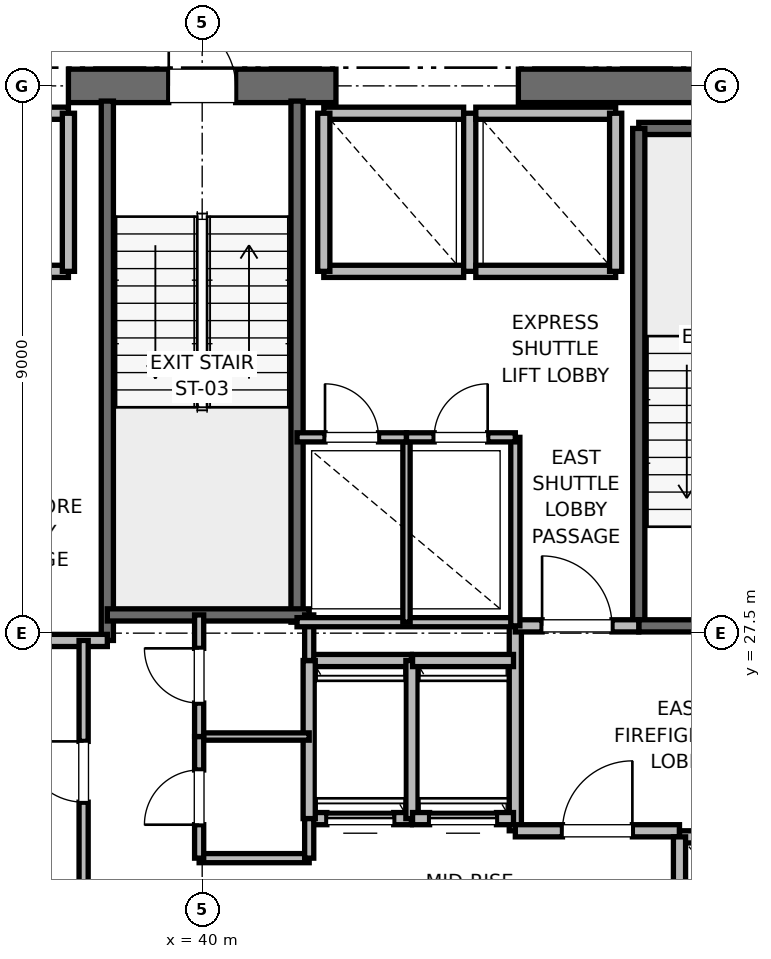
"""IFC4 building model, lengths in metres.
Left out: names, types, materials, properties, quantities, classifications, styles, units other than length and angle.
Written with IfcOpenShell. Run it as: python <this file> out.ifc"""

import sys

from ifc_helpers import new_model, si_unit, direction, frame, frame_2d, origin, place, context, subcontext, project, spatial, rectangle, extrude, element, fill, save


model = new_model("IFC4")
c1 = context("Model", 3, precision=1e-05, world=origin(), true_north=direction((0.0, 1.0)))
c2 = subcontext(c1, "Body", "Model", "MODEL_VIEW")
j1 = project(units=[si_unit("LENGTHUNIT", "METRE"), si_unit("PLANEANGLEUNIT", "RADIAN")], contexts=[c1])
p1 = place(None, origin())
s1 = spatial("IfcSite", under=j1, at=p1, CompositionType="ELEMENT")
p2 = place(p1, origin())
s2 = spatial("IfcBuilding", under=s1, at=p2, CompositionType="ELEMENT")
p3 = place(p2, frame((0.0, 0.0, 229.2)))
s3 = spatial("IfcBuildingStorey", under=s2, at=p3, CompositionType="ELEMENT", Elevation=229.2)
p4 = place(p3, frame((37.8, 36.5, 0.0), z_axis=(0.0, 0.0, 1.0), x_axis=(1.0, 0.0, 0.0)))
e1 = element("IfcWall", 1, at=p4, inside=s3, PredefinedType="SHEAR", context=c2, shape_type="SweptSolid", body=[
    extrude(rectangle(XDim=4.4, YDim=0.55, at=frame_2d((2.2, 0.0))), origin(), (0.0, 0.0, 1.0), 3.7),
])
p5 = place(p4, frame((1.65, 0.0, 0.0)))
e2 = element("IfcOpeningElement", 2, at=p5, cuts=e1, PredefinedType="OPENING", context=c2, shape_type="SweptSolid", body=[
    extrude(rectangle(XDim=1.1, YDim=2.15, at=frame_2d((0.55, 1.075))), frame((0.0, 0.275, 0.0), z_axis=(0.0, -1.0, 0.0), x_axis=(1.0, 0.0, 0.0)), (0.0, 0.0, 1.0), 0.55),
])
p6 = place(p3, frame((45.2, 36.5, 0.0), z_axis=(0.0, 0.0, 1.0), x_axis=(1.0, 0.0, 0.0)))
e3 = element("IfcWall", 3, at=p6, inside=s3, PredefinedType="SHEAR", context=c2, shape_type="SweptSolid", body=[
    extrude(rectangle(XDim=5.8, YDim=0.55, at=frame_2d((2.9, 0.0))), origin(), (0.0, 0.0, 1.0), 3.7),
])
p7 = place(p3, frame((47.18, 35.8, 0.0), z_axis=(0.0, 0.0, 1.0), x_axis=(1.0, 0.0, 0.0)))
e4 = element("IfcWall", 4, at=p7, inside=s3, PredefinedType="SOLIDWALL", context=c2, shape_type="SweptSolid", body=[
    extrude(rectangle(XDim=3.12, YDim=0.2, at=frame_2d((1.56, 0.0))), origin(), (0.0, 0.0, 1.0), 3.7),
])
p8 = place(p3, frame((47.18, 27.62, 0.0), z_axis=(0.0, 0.0, 1.0), x_axis=(0.0, 1.0, 0.0)))
e5 = element("IfcWall", 5, at=p8, inside=s3, PredefinedType="SOLIDWALL", context=c2, shape_type="SweptSolid", body=[
    extrude(rectangle(XDim=8.18, YDim=0.2, at=frame_2d((4.09, 0.0))), origin(), (0.0, 0.0, 1.0), 3.7),
])
p9 = place(p3, frame((47.18, 27.62, 0.0), z_axis=(0.0, 0.0, 1.0), x_axis=(1.0, 0.0, 0.0)))
e6 = element("IfcWall", 6, at=p9, inside=s3, PredefinedType="SOLIDWALL", context=c2, shape_type="SweptSolid", body=[
    extrude(rectangle(XDim=3.12, YDim=0.2, at=frame_2d((1.56, 0.0))), origin(), (0.0, 0.0, 1.0), 3.7),
])
p10 = place(p9, frame((1.01, 0.0, 0.0)))
e7 = element("IfcOpeningElement", 7, at=p10, cuts=e6, PredefinedType="OPENING", context=c2, shape_type="SweptSolid", body=[
    extrude(rectangle(XDim=1.1, YDim=2.15, at=frame_2d((0.55, 1.075))), frame((0.0, 0.1, 0.0), z_axis=(0.0, -1.0, 0.0), x_axis=(1.0, 0.0, 0.0)), (0.0, 0.0, 1.0), 0.2),
])
p11 = place(p3, frame((38.44, 27.38, 0.0), z_axis=(0.0, 0.0, 1.0), x_axis=(0.0, 1.0, 0.0)))
e8 = element("IfcWall", 8, at=p11, inside=s3, PredefinedType="SOLIDWALL", context=c2, shape_type="SweptSolid", body=[
    extrude(rectangle(XDim=8.87, YDim=0.2, at=frame_2d((4.435, 0.0))), origin(), (0.0, 0.0, 1.0), 3.7),
])
p12 = place(p3, frame((41.56, 27.68, 0.0), z_axis=(0.0, 0.0, 1.0), x_axis=(0.0, 1.0, 0.0)))
e9 = element("IfcWall", 9, at=p12, inside=s3, PredefinedType="SOLIDWALL", context=c2, shape_type="SweptSolid", body=[
    extrude(rectangle(XDim=8.57, YDim=0.2, at=frame_2d((4.285, 0.0))), origin(), (0.0, 0.0, 1.0), 3.7),
])
p13 = place(p3, frame((38.44, 27.8, 0.0), z_axis=(0.0, 0.0, 1.0), x_axis=(1.0, 0.0, 0.0)))
e10 = element("IfcWall", 10, at=p13, inside=s3, PredefinedType="SOLIDWALL", context=c2, shape_type="SweptSolid", body=[
    extrude(rectangle(XDim=3.32, YDim=0.2, at=frame_2d((1.66, 0.0))), origin(), (0.0, 0.0, 1.0), 3.7),
])
p14 = place(p3, frame((32.82, 27.38, 0.0), z_axis=(0.0, 0.0, 1.0), x_axis=(1.0, 0.0, 0.0)))
e11 = element("IfcWall", 11, at=p14, inside=s3, PredefinedType="PARTITIONING", context=c2, shape_type="SweptSolid", body=[
    extrude(rectangle(XDim=5.62, YDim=0.2, at=frame_2d((2.81, 0.0))), origin(), (0.0, 0.0, 1.0), 3.7),
])
p15 = place(p3, frame((45.15, 24.25, 0.0), z_axis=(0.0, 0.0, 1.0), x_axis=(0.0, 1.0, 0.0)))
e12 = element("IfcWall", 12, at=p15, inside=s3, PredefinedType="PARTITIONING", context=c2, shape_type="SweptSolid", body=[
    extrude(rectangle(XDim=3.37, YDim=0.2, at=frame_2d((1.685, 0.0))), origin(), (0.0, 0.0, 1.0), 3.7),
])
p16 = place(p3, frame((45.15, 24.25, 0.0), z_axis=(0.0, 0.0, 1.0), x_axis=(1.0, 0.0, 0.0)))
e13 = element("IfcWall", 13, at=p16, inside=s3, PredefinedType="PARTITIONING", context=c2, shape_type="SweptSolid", body=[
    extrude(rectangle(XDim=2.7, YDim=0.2, at=frame_2d((1.35, 0.0))), origin(), (0.0, 0.0, 1.0), 3.7),
])
p17 = place(p16, frame((0.775, 0.0, 0.0)))
e14 = element("IfcOpeningElement", 14, at=p17, cuts=e13, PredefinedType="OPENING", context=c2, shape_type="SweptSolid", body=[
    extrude(rectangle(XDim=1.15, YDim=2.2, at=frame_2d((0.575, 1.1))), frame((0.0, 0.1, 0.0), z_axis=(0.0, -1.0, 0.0), x_axis=(1.0, 0.0, 0.0)), (0.0, 0.0, 1.0), 0.2),
])
p18 = place(p3, frame((45.15, 27.62, 0.0), z_axis=(0.0, 0.0, 1.0), x_axis=(1.0, 0.0, 0.0)))
e15 = element("IfcWall", 15, at=p18, inside=s3, PredefinedType="PARTITIONING", context=c2, shape_type="SweptSolid", body=[
    extrude(rectangle(XDim=2.03, YDim=0.2, at=frame_2d((1.015, 0.0))), origin(), (0.0, 0.0, 1.0), 3.7),
])
p19 = place(p18, frame((0.44, 0.0, 0.0)))
e16 = element("IfcOpeningElement", 16, at=p19, cuts=e15, PredefinedType="OPENING", context=c2, shape_type="SweptSolid", body=[
    extrude(rectangle(XDim=1.15, YDim=2.2, at=frame_2d((0.575, 1.1))), frame((0.0, 0.1, 0.0), z_axis=(0.0, -1.0, 0.0), x_axis=(1.0, 0.0, 0.0)), (0.0, 0.0, 1.0), 0.2),
])
p20 = place(p3, frame((50.45, 24.15, 0.0), z_axis=(0.0, 0.0, 1.0), x_axis=(-1.0, 0.0, 0.0)))
e17 = element("IfcWall", 17, at=p20, inside=s3, PredefinedType="SOLIDWALL", context=c2, shape_type="SweptSolid", body=[
    extrude(rectangle(XDim=2.6, YDim=0.2, at=frame_2d((1.3, 0.0))), origin(), (0.0, 0.0, 1.0), 2.68),
])
p21 = place(p20, frame((0.75, 0.0, 0.0)))
e18 = element("IfcOpeningElement", 18, at=p21, cuts=e17, PredefinedType="OPENING", context=c2, shape_type="SweptSolid", body=[
    extrude(rectangle(XDim=1.1, YDim=2.2, at=frame_2d((0.55, 1.1))), frame((0.0, 0.1, 0.0), z_axis=(0.0, -1.0, 0.0), x_axis=(1.0, 0.0, 0.0)), (0.0, 0.0, 1.0), 0.2),
])
p22 = place(p3, frame((47.85, 24.15, 0.0), z_axis=(0.0, 0.0, 1.0), x_axis=(0.0, -1.0, 0.0)))
e19 = element("IfcWall", 19, at=p22, inside=s3, PredefinedType="SOLIDWALL", context=c2, shape_type="SweptSolid", body=[
    extrude(rectangle(XDim=3.0, YDim=0.2, at=frame_2d((1.5, 0.0))), origin(), (0.0, 0.0, 1.0), 3.7),
])
p23 = place(p3, frame((41.76, 24.45, 0.0), z_axis=(0.0, 0.0, 1.0), x_axis=(1.0, 0.0, 0.0)))
e20 = element("IfcWall", 20, at=p23, inside=s3, PredefinedType="SOLIDWALL", context=c2, shape_type="SweptSolid", body=[
    extrude(rectangle(XDim=1.68, YDim=0.2, at=frame_2d((0.84, 0.0))), origin(), (0.0, 0.0, 1.0), 3.7),
])
p24 = place(p23, frame((0.29, 0.0, 0.0)))
e21 = element("IfcOpeningElement", 21, at=p24, cuts=e20, PredefinedType="OPENING", context=c2, shape_type="SweptSolid", body=[
    extrude(rectangle(XDim=1.1, YDim=2.2, at=frame_2d((0.55, 1.1))), frame((0.0, 0.1, 0.0), z_axis=(0.0, -1.0, 0.0), x_axis=(1.0, 0.0, 0.0)), (0.0, 0.0, 1.0), 0.2),
])
p25 = place(p3, frame((43.44, 27.05, 0.0), z_axis=(0.0, 0.0, 1.0), x_axis=(-1.0, 0.0, 0.0)))
e22 = element("IfcWall", 22, at=p25, inside=s3, PredefinedType="SOLIDWALL", context=c2, shape_type="SweptSolid", body=[
    extrude(rectangle(XDim=1.68, YDim=0.2, at=frame_2d((0.84, 0.0))), origin(), (0.0, 0.0, 1.0), 3.7),
])
for number, where, z_axis, x_axis in (
    (23, (41.76, 27.05, 0.0), (0.0, 0.0, 1.0), (0.0, -1.0, 0.0)),
    (24, (43.45, 24.45, 0.0), (0.0, 0.0, 1.0), (0.0, 1.0, 0.0)),
):
    element("IfcWall", number, at=place(p3, frame(where, z_axis=z_axis, x_axis=x_axis)), inside=s3, PredefinedType="SOLIDWALL", context=c2, shape_type="SweptSolid", body=[
        extrude(rectangle(XDim=2.6, YDim=0.2, at=frame_2d((1.3, 0.0))), origin(), (0.0, 0.0, 1.0), 3.7),
    ])
p26 = place(p3, frame((43.46, 24.45, 0.0), z_axis=(0.0, 0.0, 1.0), x_axis=(1.0, 0.0, 0.0)))
e25 = element("IfcWall", 25, at=p26, inside=s3, PredefinedType="SOLIDWALL", context=c2, shape_type="SweptSolid", body=[
    extrude(rectangle(XDim=1.66, YDim=0.2, at=frame_2d((0.83, 0.0))), origin(), (0.0, 0.0, 1.0), 3.7),
])
p27 = place(p26, frame((0.28, 0.0, 0.0)))
e26 = element("IfcOpeningElement", 26, at=p27, cuts=e25, PredefinedType="OPENING", context=c2, shape_type="SweptSolid", body=[
    extrude(rectangle(XDim=1.1, YDim=2.2, at=frame_2d((0.55, 1.1))), frame((0.0, 0.1, 0.0), z_axis=(0.0, -1.0, 0.0), x_axis=(1.0, 0.0, 0.0)), (0.0, 0.0, 1.0), 0.2),
])
p28 = place(p3, frame((45.12, 27.05, 0.0), z_axis=(0.0, 0.0, 1.0), x_axis=(-1.0, 0.0, 0.0)))
e27 = element("IfcWall", 27, at=p28, inside=s3, PredefinedType="SOLIDWALL", context=c2, shape_type="SweptSolid", body=[
    extrude(rectangle(XDim=1.66, YDim=0.2, at=frame_2d((0.83, 0.0))), origin(), (0.0, 0.0, 1.0), 3.7),
])
p29 = place(p3, frame((35.5, 33.45, 0.0), z_axis=(0.0, 0.0, 1.0), x_axis=(1.0, 0.0, 0.0)))
e28 = element("IfcWall", 28, at=p29, inside=s3, PredefinedType="SOLIDWALL", context=c2, shape_type="SweptSolid", body=[
    extrude(rectangle(XDim=2.3, YDim=0.2, at=frame_2d((1.15, 0.0))), origin(), (0.0, 0.0, 1.0), 3.7),
])
p30 = place(p3, frame((37.8, 36.05, 0.0), z_axis=(0.0, 0.0, 1.0), x_axis=(-1.0, 0.0, 0.0)))
e29 = element("IfcWall", 29, at=p30, inside=s3, PredefinedType="SOLIDWALL", context=c2, shape_type="SweptSolid", body=[
    extrude(rectangle(XDim=2.3, YDim=0.2, at=frame_2d((1.15, 0.0))), origin(), (0.0, 0.0, 1.0), 2.68),
])
p31 = place(p3, frame((37.8, 33.45, 0.0), z_axis=(0.0, 0.0, 1.0), x_axis=(0.0, 1.0, 0.0)))
e30 = element("IfcWall", 30, at=p31, inside=s3, PredefinedType="SOLIDWALL", context=c2, shape_type="SweptSolid", body=[
    extrude(rectangle(XDim=2.6, YDim=0.2, at=frame_2d((1.3, 0.0))), origin(), (0.0, 0.0, 1.0), 2.68),
])
p32 = place(p3, frame((42.0, 33.45, 0.0), z_axis=(0.0, 0.0, 1.0), x_axis=(1.0, 0.0, 0.0)))
e31 = element("IfcWall", 31, at=p32, inside=s3, PredefinedType="SOLIDWALL", context=c2, shape_type="SweptSolid", body=[
    extrude(rectangle(XDim=2.3, YDim=0.2, at=frame_2d((1.15, 0.0))), origin(), (0.0, 0.0, 1.0), 3.7),
])
p33 = place(p3, frame((44.3, 36.05, 0.0), z_axis=(0.0, 0.0, 1.0), x_axis=(-1.0, 0.0, 0.0)))
e32 = element("IfcWall", 32, at=p33, inside=s3, PredefinedType="SOLIDWALL", context=c2, shape_type="SweptSolid", body=[
    extrude(rectangle(XDim=2.3, YDim=0.2, at=frame_2d((1.15, 0.0))), origin(), (0.0, 0.0, 1.0), 2.68),
])
for number, where, z_axis, x_axis in (
    (33, (42.0, 36.05, 0.0), (0.0, 0.0, 1.0), (0.0, -1.0, 0.0)),
    (34, (44.4, 33.45, 0.0), (0.0, 0.0, 1.0), (0.0, 1.0, 0.0)),
):
    element("IfcWall", number, at=place(p3, frame(where, z_axis=z_axis, x_axis=x_axis)), inside=s3, PredefinedType="SOLIDWALL", context=c2, shape_type="SweptSolid", body=[
        extrude(rectangle(XDim=2.6, YDim=0.2, at=frame_2d((1.3, 0.0))), origin(), (0.0, 0.0, 1.0), 2.68),
    ])
p34 = place(p3, frame((44.5, 33.45, 0.0), z_axis=(0.0, 0.0, 1.0), x_axis=(1.0, 0.0, 0.0)))
e35 = element("IfcWall", 35, at=p34, inside=s3, PredefinedType="SOLIDWALL", context=c2, shape_type="SweptSolid", body=[
    extrude(rectangle(XDim=2.3, YDim=0.2, at=frame_2d((1.15, 0.0))), origin(), (0.0, 0.0, 1.0), 3.7),
])
p35 = place(p3, frame((46.8, 36.05, 0.0), z_axis=(0.0, 0.0, 1.0), x_axis=(-1.0, 0.0, 0.0)))
e36 = element("IfcWall", 36, at=p35, inside=s3, PredefinedType="SOLIDWALL", context=c2, shape_type="SweptSolid", body=[
    extrude(rectangle(XDim=2.3, YDim=0.2, at=frame_2d((1.15, 0.0))), origin(), (0.0, 0.0, 1.0), 2.68),
])
p36 = place(p3, frame((46.8, 33.45, 0.0), z_axis=(0.0, 0.0, 1.0), x_axis=(0.0, 1.0, 0.0)))
e37 = element("IfcWall", 37, at=p36, inside=s3, PredefinedType="SOLIDWALL", context=c2, shape_type="SweptSolid", body=[
    extrude(rectangle(XDim=2.6, YDim=0.2, at=frame_2d((1.3, 0.0))), origin(), (0.0, 0.0, 1.0), 3.7),
])
p37 = place(p3, frame((39.95, 23.8, 0.0), z_axis=(0.0, 0.0, 1.0), x_axis=(1.0, 0.0, 0.0)))
e38 = element("IfcWall", 38, at=p37, inside=s3, PredefinedType="PARTITIONING", context=c2, shape_type="SweptSolid", body=[
    extrude(rectangle(XDim=1.81, YDim=0.15, at=frame_2d((0.905, 0.0))), origin(), (0.0, 0.0, 1.0), 2.85),
])
p38 = place(p3, frame((39.95, 25.8, 0.0), z_axis=(0.0, 0.0, 1.0), x_axis=(1.0, 0.0, 0.0)))
e39 = element("IfcWall", 39, at=p38, inside=s3, PredefinedType="PARTITIONING", context=c2, shape_type="SweptSolid", body=[
    extrude(rectangle(XDim=1.81, YDim=0.12, at=frame_2d((0.905, 0.0))), origin(), (0.0, 0.0, 1.0), 2.85),
])
p39 = place(p3, frame((41.76, 23.8, 0.0), z_axis=(0.0, 0.0, 1.0), x_axis=(0.0, 1.0, 0.0)))
e40 = element("IfcWall", 40, at=p39, inside=s3, PredefinedType="PARTITIONING", context=c2, shape_type="SweptSolid", body=[
    extrude(rectangle(XDim=0.65, YDim=0.15, at=frame_2d((0.325, 0.0))), origin(), (0.0, 0.0, 1.0), 2.85),
])
p40 = place(p3, frame((41.76, 27.05, 0.0), z_axis=(0.0, 0.0, 1.0), x_axis=(0.0, 1.0, 0.0)))
e41 = element("IfcWall", 41, at=p40, inside=s3, PredefinedType="PARTITIONING", context=c2, shape_type="SweptSolid", body=[
    extrude(rectangle(XDim=0.75, YDim=0.15, at=frame_2d((0.375, 0.0))), origin(), (0.0, 0.0, 1.0), 2.85),
])
p41 = place(p3, frame((39.95, 23.8, 0.0), z_axis=(0.0, 0.0, 1.0), x_axis=(0.0, 1.0, 0.0)))
e42 = element("IfcWall", 42, at=p41, inside=s3, PredefinedType="PARTITIONING", context=c2, shape_type="SweptSolid", body=[
    extrude(rectangle(XDim=2.0, YDim=0.15, at=frame_2d((1.0, 0.0))), origin(), (0.0, 0.0, 1.0), 2.85),
])
p42 = place(p41, frame((0.55, 0.0, 0.0)))
e43 = element("IfcOpeningElement", 43, at=p42, cuts=e42, PredefinedType="OPENING", context=c2, shape_type="SweptSolid", body=[
    extrude(rectangle(XDim=0.9, YDim=2.1, at=frame_2d((0.45, 1.05))), frame((0.0, 0.075, 0.0), z_axis=(0.0, -1.0, 0.0), x_axis=(1.0, 0.0, 0.0)), (0.0, 0.0, 1.0), 0.15),
])
p43 = place(p3, frame((39.95, 25.8, 0.0), z_axis=(0.0, 0.0, 1.0), x_axis=(0.0, 1.0, 0.0)))
e44 = element("IfcWall", 44, at=p43, inside=s3, PredefinedType="PARTITIONING", context=c2, shape_type="SweptSolid", body=[
    extrude(rectangle(XDim=2.0, YDim=0.15, at=frame_2d((1.0, 0.0))), origin(), (0.0, 0.0, 1.0), 2.85),
])
p44 = place(p43, frame((0.55, 0.0, 0.0)))
e45 = element("IfcOpeningElement", 45, at=p44, cuts=e44, PredefinedType="OPENING", context=c2, shape_type="SweptSolid", body=[
    extrude(rectangle(XDim=0.9, YDim=2.1, at=frame_2d((0.45, 1.05))), frame((0.0, 0.075, 0.0), z_axis=(0.0, -1.0, 0.0), x_axis=(1.0, 0.0, 0.0)), (0.0, 0.0, 1.0), 0.15),
])
p45 = place(p3, frame((38.05, 23.06, 0.0), z_axis=(0.0, 0.0, 1.0), x_axis=(0.0, 1.0, 0.0)))
e46 = element("IfcWall", 46, at=p45, inside=s3, PredefinedType="PARTITIONING", context=c2, shape_type="SweptSolid", body=[
    extrude(rectangle(XDim=4.32, YDim=0.15, at=frame_2d((2.16, 0.0))), origin(), (0.0, 0.0, 1.0), 2.85),
])
p46 = place(p45, frame((1.66, 0.0, 0.0)))
e47 = element("IfcOpeningElement", 47, at=p46, cuts=e46, PredefinedType="OPENING", context=c2, shape_type="SweptSolid", body=[
    extrude(rectangle(XDim=1.0, YDim=2.15, at=frame_2d((0.5, 1.075))), frame((0.0, 0.075, 0.0), z_axis=(0.0, -1.0, 0.0), x_axis=(1.0, 0.0, 0.0)), (0.0, 0.0, 1.0), 0.15),
])
p47 = place(p3, frame((41.56, 27.68, 0.0), z_axis=(0.0, 0.0, 1.0), x_axis=(1.0, 0.0, 0.0)))
e48 = element("IfcWall", 48, at=p47, inside=s3, PredefinedType="PARTITIONING", context=c2, shape_type="SweptSolid", body=[
    extrude(rectangle(XDim=3.59, YDim=0.15, at=frame_2d((1.795, 0.0))), origin(), (0.0, 0.0, 1.0), 2.85),
])
p48 = place(p3, frame((45.15, 27.62, 0.0), z_axis=(0.0, 0.0, 1.0), x_axis=(0.0, 1.0, 0.0)))
e49 = element("IfcWall", 49, at=p48, inside=s3, PredefinedType="PARTITIONING", context=c2, shape_type="SweptSolid", body=[
    extrude(rectangle(XDim=3.1, YDim=0.15, at=frame_2d((1.55, 0.0))), origin(), (0.0, 0.0, 1.0), 2.85),
])
p49 = place(p3, frame((43.36, 27.68, 0.0), z_axis=(0.0, 0.0, 1.0), x_axis=(0.0, 1.0, 0.0)))
e50 = element("IfcWall", 50, at=p49, inside=s3, PredefinedType="PARTITIONING", context=c2, shape_type="SweptSolid", body=[
    extrude(rectangle(XDim=3.04, YDim=0.12, at=frame_2d((1.52, 0.0))), origin(), (0.0, 0.0, 1.0), 2.85),
])
p50 = place(p3, frame((41.56, 30.72, 0.0), z_axis=(0.0, 0.0, 1.0), x_axis=(1.0, 0.0, 0.0)))
e51 = element("IfcWall", 51, at=p50, inside=s3, PredefinedType="PARTITIONING", context=c2, shape_type="SweptSolid", body=[
    extrude(rectangle(XDim=1.8, YDim=0.15, at=frame_2d((0.9, 0.0))), origin(), (0.0, 0.0, 1.0), 2.85),
])
p51 = place(p50, frame((0.46, 0.0, 0.0)))
e52 = element("IfcOpeningElement", 52, at=p51, cuts=e51, PredefinedType="OPENING", context=c2, shape_type="SweptSolid", body=[
    extrude(rectangle(XDim=0.88, YDim=2.1, at=frame_2d((0.44, 1.05))), frame((0.0, 0.075, 0.0), z_axis=(0.0, -1.0, 0.0), x_axis=(1.0, 0.0, 0.0)), (0.0, 0.0, 1.0), 0.15),
])
p52 = place(p3, frame((43.36, 30.72, 0.0), z_axis=(0.0, 0.0, 1.0), x_axis=(1.0, 0.0, 0.0)))
e53 = element("IfcWall", 53, at=p52, inside=s3, PredefinedType="PARTITIONING", context=c2, shape_type="SweptSolid", body=[
    extrude(rectangle(XDim=1.79, YDim=0.15, at=frame_2d((0.895, 0.0))), origin(), (0.0, 0.0, 1.0), 2.85),
])
p53 = place(p52, frame((0.455, 0.0, 0.0)))
e54 = element("IfcOpeningElement", 54, at=p53, cuts=e53, PredefinedType="OPENING", context=c2, shape_type="SweptSolid", body=[
    extrude(rectangle(XDim=0.88, YDim=2.1, at=frame_2d((0.44, 1.05))), frame((0.0, 0.075, 0.0), z_axis=(0.0, -1.0, 0.0), x_axis=(1.0, 0.0, 0.0)), (0.0, 0.0, 1.0), 0.15),
])
p54 = place(p5, origin())
e55 = element("IfcDoor", 55, at=p54, inside=s3, OperationType="SINGLE_SWING_LEFT", PredefinedType="DOOR", context=c2, shape_type="SweptSolid", body=[
    extrude(rectangle(XDim=1.1, YDim=2.15, at=frame_2d((0.55, 1.075))), frame((0.0, 0.025, 0.0), z_axis=(0.0, -1.0, 0.0), x_axis=(1.0, 0.0, 0.0)), (0.0, 0.0, 1.0), 0.05),
])
fill(e2, e55)
p55 = place(p17, origin())
e56 = element("IfcDoor", 56, at=p55, inside=s3, OperationType="SINGLE_SWING_RIGHT", PredefinedType="DOOR", context=c2, shape_type="SweptSolid", body=[
    extrude(rectangle(XDim=1.15, YDim=2.2, at=frame_2d((0.575, 1.1))), frame((0.0, 0.025, 0.0), z_axis=(0.0, -1.0, 0.0), x_axis=(1.0, 0.0, 0.0)), (0.0, 0.0, 1.0), 0.05),
])
fill(e14, e56)
p56 = place(p19, origin())
e57 = element("IfcDoor", 57, at=p56, inside=s3, OperationType="SINGLE_SWING_LEFT", PredefinedType="DOOR", context=c2, shape_type="SweptSolid", body=[
    extrude(rectangle(XDim=1.15, YDim=2.2, at=frame_2d((0.575, 1.1))), frame((0.0, 0.025, 0.0), z_axis=(0.0, -1.0, 0.0), x_axis=(1.0, 0.0, 0.0)), (0.0, 0.0, 1.0), 0.05),
])
fill(e16, e57)
p57 = place(p24, origin())
e58 = element("IfcDoor", 58, at=p57, inside=s3, OperationType="SLIDING_TO_RIGHT", PredefinedType="DOOR", context=c2, shape_type="SweptSolid", body=[
    extrude(rectangle(XDim=1.1, YDim=2.2, at=frame_2d((0.55, 1.1))), frame((0.0, 0.025, 0.0), z_axis=(0.0, -1.0, 0.0), x_axis=(1.0, 0.0, 0.0)), (0.0, 0.0, 1.0), 0.05),
])
fill(e21, e58)
p58 = place(p27, origin())
e59 = element("IfcDoor", 59, at=p58, inside=s3, OperationType="SLIDING_TO_RIGHT", PredefinedType="DOOR", context=c2, shape_type="SweptSolid", body=[
    extrude(rectangle(XDim=1.1, YDim=2.2, at=frame_2d((0.55, 1.1))), frame((0.0, 0.025, 0.0), z_axis=(0.0, -1.0, 0.0), x_axis=(1.0, 0.0, 0.0)), (0.0, 0.0, 1.0), 0.05),
])
fill(e26, e59)
p59 = place(p42, origin())
e60 = element("IfcDoor", 60, at=p59, inside=s3, OperationType="SINGLE_SWING_LEFT", PredefinedType="DOOR", context=c2, shape_type="SweptSolid", body=[
    extrude(rectangle(XDim=0.9, YDim=2.1, at=frame_2d((0.45, 1.05))), frame((0.0, 0.025, 0.0), z_axis=(0.0, -1.0, 0.0), x_axis=(1.0, 0.0, 0.0)), (0.0, 0.0, 1.0), 0.05),
])
fill(e43, e60)
p60 = place(p44, origin())
e61 = element("IfcDoor", 61, at=p60, inside=s3, OperationType="SINGLE_SWING_RIGHT", PredefinedType="DOOR", context=c2, shape_type="SweptSolid", body=[
    extrude(rectangle(XDim=0.9, YDim=2.1, at=frame_2d((0.45, 1.05))), frame((0.0, 0.025, 0.0), z_axis=(0.0, -1.0, 0.0), x_axis=(1.0, 0.0, 0.0)), (0.0, 0.0, 1.0), 0.05),
])
fill(e45, e61)
p61 = place(p46, origin())
e62 = element("IfcDoor", 62, at=p61, inside=s3, OperationType="SINGLE_SWING_RIGHT", PredefinedType="DOOR", context=c2, shape_type="SweptSolid", body=[
    extrude(rectangle(XDim=1.0, YDim=2.15, at=frame_2d((0.5, 1.075))), frame((0.0, 0.025, 0.0), z_axis=(0.0, -1.0, 0.0), x_axis=(1.0, 0.0, 0.0)), (0.0, 0.0, 1.0), 0.05),
])
fill(e47, e62)
p62 = place(p51, origin())
e63 = element("IfcDoor", 63, at=p62, inside=s3, OperationType="SINGLE_SWING_LEFT", PredefinedType="DOOR", context=c2, shape_type="SweptSolid", body=[
    extrude(rectangle(XDim=0.88, YDim=2.1, at=frame_2d((0.44, 1.05))), frame((0.0, 0.025, 0.0), z_axis=(0.0, -1.0, 0.0), x_axis=(1.0, 0.0, 0.0)), (0.0, 0.0, 1.0), 0.05),
])
fill(e52, e63)
p63 = place(p53, origin())
e64 = element("IfcDoor", 64, at=p63, inside=s3, OperationType="SINGLE_SWING_RIGHT", PredefinedType="DOOR", context=c2, shape_type="SweptSolid", body=[
    extrude(rectangle(XDim=0.88, YDim=2.1, at=frame_2d((0.44, 1.05))), frame((0.0, 0.025, 0.0), z_axis=(0.0, -1.0, 0.0), x_axis=(1.0, 0.0, 0.0)), (0.0, 0.0, 1.0), 0.05),
])
fill(e54, e64)
save(model, sys.argv[1])
